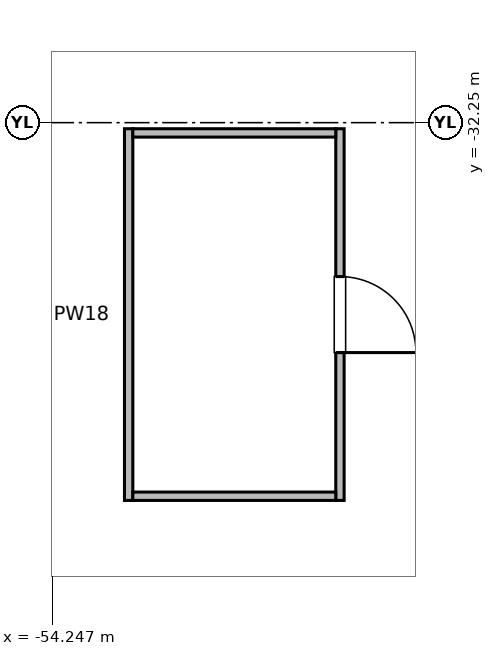
"""IFC4 building model, lengths in metres.
Left out: names, types, materials, properties, quantities, classifications, styles, units other than length and angle.
Written with IfcOpenShell. Run it as: python <this file> out.ifc"""

import sys

from ifc_helpers import new_model, si_unit, direction, frame, frame_2d, origin, place, context, subcontext, project, spatial, rectangle, extrude, element, fill, save


model = new_model("IFC4")
c1 = context("Model", 3, precision=1e-05, world=origin(), true_north=direction((0.0, 1.0)))
c2 = subcontext(c1, "Body", "Model", "MODEL_VIEW")
j1 = project(units=[si_unit("LENGTHUNIT", "METRE"), si_unit("PLANEANGLEUNIT", "RADIAN")], contexts=[c1])
p1 = place(None, origin())
s1 = spatial("IfcSite", under=j1, at=p1, CompositionType="ELEMENT")
p2 = place(p1, origin())
s2 = spatial("IfcBuilding", under=s1, at=p2, CompositionType="ELEMENT")
p3 = place(p2, frame((0.0, 0.0, -6.0)))
s3 = spatial("IfcBuildingStorey", under=s2, at=p3, CompositionType="ELEMENT", Elevation=-6.0)
p4 = place(p3, frame((-50.462, -32.33, 0.0), z_axis=(0.0, 0.0, 1.0), x_axis=(0.0, -1.0, 0.0)))
e1 = element("IfcWall", 1, at=p4, inside=s3, PredefinedType="PARTITIONING", context=c2, shape_type="SweptSolid", body=[
    extrude(rectangle(XDim=4.89, YDim=0.11, at=frame_2d((2.445, 0.0))), origin(), (0.0, 0.0, 1.0), 5.02),
])
p5 = place(p4, frame((1.945, 0.0, 0.0)))
e2 = element("IfcOpeningElement", 2, at=p5, cuts=e1, PredefinedType="OPENING", context=c2, shape_type="SweptSolid", body=[
    extrude(rectangle(XDim=1.0, YDim=2.15, at=frame_2d((0.5, 1.075))), frame((0.0, 0.065, 0.0), z_axis=(0.0, -1.0, 0.0), x_axis=(1.0, 0.0, 0.0)), (0.0, 0.0, 1.0), 0.13),
])
p6 = place(p3, frame((-53.242, -37.22, 0.0), z_axis=(0.0, 0.0, 1.0), x_axis=(0.0, 1.0, 0.0)))
e3 = element("IfcWall", 3, at=p6, inside=s3, PredefinedType="PARTITIONING", context=c2, shape_type="SweptSolid", body=[
    extrude(rectangle(XDim=4.89, YDim=0.11, at=frame_2d((2.445, 0.0))), origin(), (0.0, 0.0, 1.0), 5.02),
])
for number, where, z_axis, x_axis in (
    (4, (-53.187, -37.165, 0.0), (0.0, 0.0, 1.0), (1.0, 0.0, 0.0)),
    (5, (-53.187, -32.385, 0.0), (0.0, 0.0, 1.0), (1.0, 0.0, 0.0)),
):
    element("IfcWall", number, at=place(p3, frame(where, z_axis=z_axis, x_axis=x_axis)), inside=s3, PredefinedType="PARTITIONING", context=c2, shape_type="SweptSolid", body=[
        extrude(rectangle(XDim=2.67, YDim=0.11, at=frame_2d((1.335, 0.0))), origin(), (0.0, 0.0, 1.0), 5.02),
    ])
p7 = place(p5, origin())
e6 = element("IfcDoor", 6, at=p7, inside=s3, OperationType="SINGLE_SWING_RIGHT", PredefinedType="DOOR", context=c2, shape_type="SweptSolid", body=[
    extrude(rectangle(XDim=1.0, YDim=2.15, at=frame_2d((0.5, 1.075))), frame((0.0, 0.025, 0.0), z_axis=(0.0, -1.0, 0.0), x_axis=(1.0, 0.0, 0.0)), (0.0, 0.0, 1.0), 0.05),
])
fill(e2, e6)
save(model, sys.argv[1])
